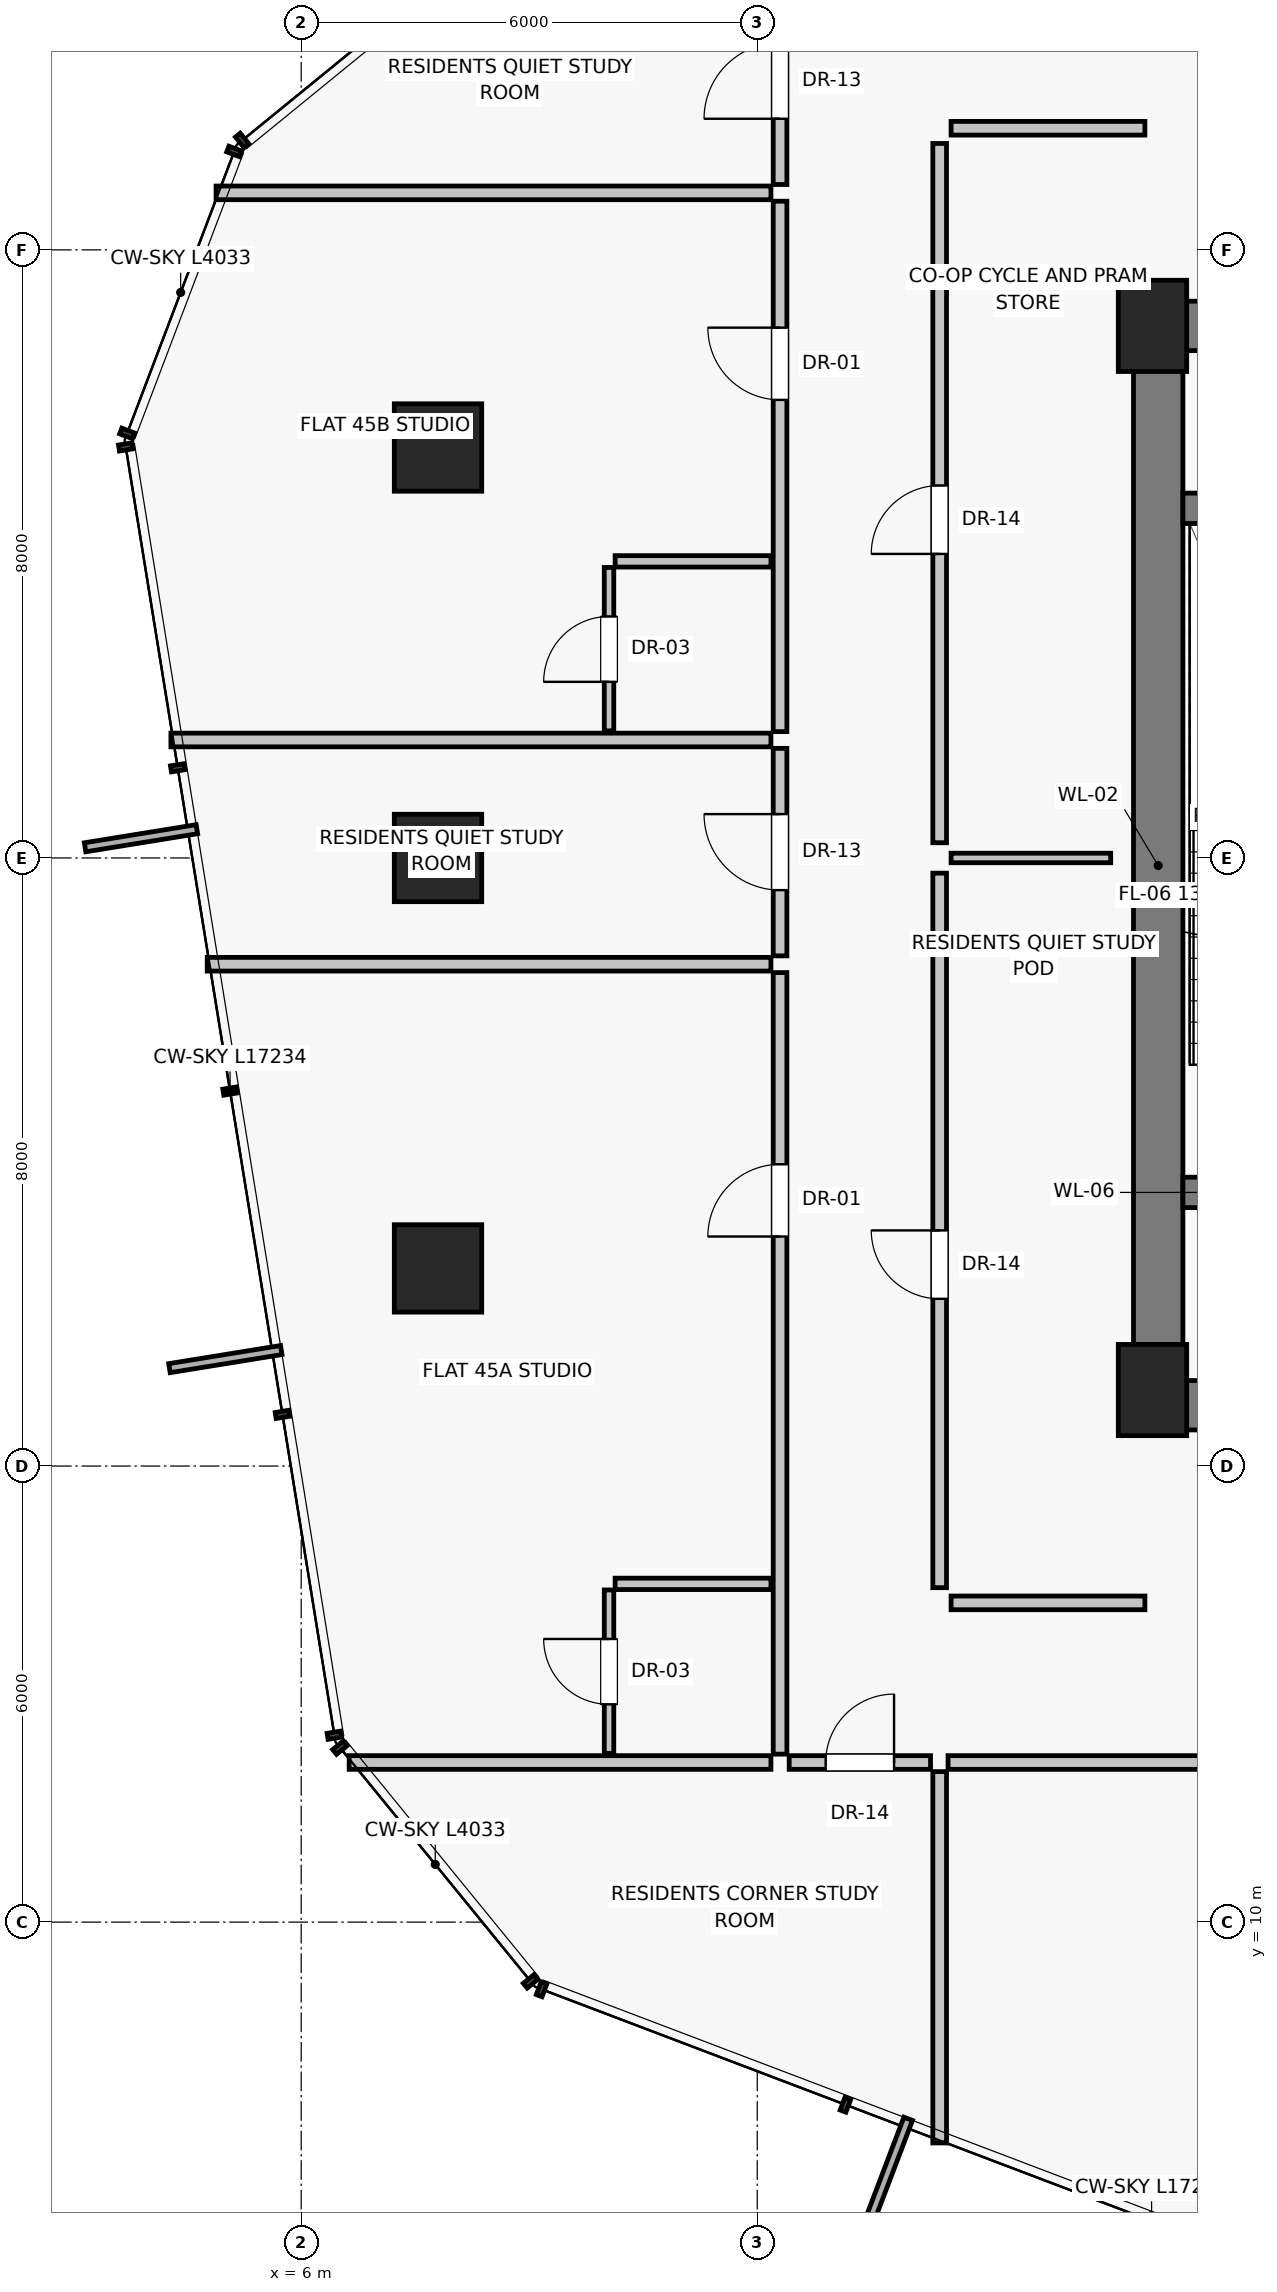
"""IFC4 building model, lengths in metres.
Left out: names, types, materials, properties, quantities, classifications, styles, units other than length and angle.
Written with IfcOpenShell. Run it as: python <this file> out.ifc"""

import sys

from ifc_helpers import new_model, si_unit, direction, frame, frame_2d, origin, origin_2d, place, context, subcontext, project, spatial, rectangle, extrude, source, transform, mapped, element, fill, save


model = new_model("IFC4")
c1 = context("Model", 3, precision=1e-05, world=origin(), true_north=direction((0.0, 1.0)))
c2 = subcontext(c1, "Body", "Model", "MODEL_VIEW")
j1 = project(units=[si_unit("LENGTHUNIT", "METRE"), si_unit("PLANEANGLEUNIT", "RADIAN")], contexts=[c1])
p1 = place(None, origin())
s1 = spatial("IfcSite", under=j1, at=p1, CompositionType="ELEMENT")
p2 = place(p1, origin())
s2 = spatial("IfcBuilding", under=s1, at=p2, CompositionType="ELEMENT")
p3 = place(p2, frame((0.0, 0.0, 158.75)))
s3 = spatial("IfcBuildingStorey", under=s2, at=p3, CompositionType="ELEMENT", Elevation=158.75)
for number, where, z_axis, x_axis in (
    (1, (17.2, 17.0, 0.0), (0.0, 0.0, 1.0), (1.0, 0.0, 0.0)),
    (2, (17.2, 31.0, 0.0), (0.0, 0.0, 1.0), (1.0, 0.0, 0.0)),
):
    element("IfcColumn", number, at=place(p3, frame(where, z_axis=z_axis, x_axis=x_axis)), inside=s3, PredefinedType="PILASTER", context=c2, shape_type="SweptSolid", body=[
        extrude(rectangle(XDim=0.9, YDim=1.2, at=origin_2d()), origin(), (0.0, 0.0, 1.0), 4.3),
    ])
for number, where, z_axis, x_axis in (
    (3, (7.8, 29.4, 0.0), (0.0, 0.0, 1.0), (1.0, 0.0, 0.0)),
    (4, (7.8, 24.0, 0.0), (0.0, 0.0, 1.0), (1.0, 0.0, 0.0)),
    (5, (7.8, 18.6, 0.0), (0.0, 0.0, 1.0), (1.0, 0.0, 0.0)),
):
    element("IfcColumn", number, at=place(p3, frame(where, z_axis=z_axis, x_axis=x_axis)), inside=s3, PredefinedType="COLUMN", context=c2, shape_type="SweptSolid", body=[
        extrude(rectangle(XDim=1.15, YDim=1.15, at=origin_2d()), origin(), (0.0, 0.0, 1.0), 4.3),
    ])
p4 = place(p3, frame((17.275, 16.8, 0.0), z_axis=(0.0, 0.0, 1.0), x_axis=(0.0, 1.0, 0.0)))
e6 = element("IfcWall", 6, at=p4, inside=s3, PredefinedType="SHEAR", context=c2, shape_type="SweptSolid", body=[
    extrude(rectangle(XDim=14.2, YDim=0.65, at=frame_2d((7.1, 0.0))), origin(), (0.0, 0.0, 1.0), 4.05),
])
p5 = place(p3, frame((17.2, 16.8, 0.0), z_axis=(0.0, 0.0, 1.0), x_axis=(1.0, 0.0, 0.0)))
e7 = element("IfcWall", 7, at=p5, inside=s3, PredefinedType="SHEAR", context=c2, shape_type="SweptSolid", body=[
    extrude(rectangle(XDim=5.85, YDim=0.65, at=frame_2d((2.925, 0.0))), origin(), (0.0, 0.0, 1.0), 4.05),
])
p6 = place(p5, frame((1.15, 0.0, 0.0)))
e8 = element("IfcOpeningElement", 8, at=p6, cuts=e7, PredefinedType="OPENING", context=c2, shape_type="SweptSolid", body=[
    extrude(rectangle(XDim=1.2, YDim=2.03, at=frame_2d((0.6, 1.015))), frame((0.0, 0.335, 0.0), z_axis=(0.0, -1.0, 0.0), x_axis=(1.0, 0.0, 0.0)), (0.0, 0.0, 1.0), 0.67),
])
p7 = place(p3, frame((17.2, 31.0, 0.0), z_axis=(0.0, 0.0, 1.0), x_axis=(1.0, 0.0, 0.0)))
e9 = element("IfcWall", 9, at=p7, inside=s3, PredefinedType="SHEAR", context=c2, shape_type="SweptSolid", body=[
    extrude(rectangle(XDim=3.8, YDim=0.65, at=frame_2d((1.9, 0.0))), origin(), (0.0, 0.0, 1.0), 4.05),
])
p8 = place(p7, frame((1.25, 0.0, 0.0)))
e10 = element("IfcOpeningElement", 10, at=p8, cuts=e9, PredefinedType="OPENING", context=c2, shape_type="SweptSolid", body=[
    extrude(rectangle(XDim=0.86, YDim=2.01, at=frame_2d((0.43, 1.005))), frame((0.0, 0.335, 0.0), z_axis=(0.0, -1.0, 0.0), x_axis=(1.0, 0.0, 0.0)), (0.0, 0.0, 1.0), 0.67),
])
p9 = place(p3, frame((17.6, 19.6, 0.0), z_axis=(0.0, 0.0, 1.0), x_axis=(1.0, 0.0, 0.0)))
e11 = element("IfcWall", 11, at=p9, inside=s3, PredefinedType="SHEAR", context=c2, shape_type="SweptSolid", body=[
    extrude(rectangle(XDim=3.4, YDim=0.4, at=frame_2d((1.7, 0.0))), origin(), (0.0, 0.0, 1.0), 4.05),
])
p10 = place(p9, frame((1.05, 0.0, 0.0)))
e12 = element("IfcOpeningElement", 12, at=p10, cuts=e11, PredefinedType="OPENING", context=c2, shape_type="SweptSolid", body=[
    extrude(rectangle(XDim=1.1, YDim=2.03, at=frame_2d((0.55, 1.015))), frame((0.0, 0.21, 0.0), z_axis=(0.0, -1.0, 0.0), x_axis=(1.0, 0.0, 0.0)), (0.0, 0.0, 1.0), 0.42),
])
p11 = place(p3, frame((17.6, 28.6, 0.0), z_axis=(0.0, 0.0, 1.0), x_axis=(1.0, 0.0, 0.0)))
e13 = element("IfcWall", 13, at=p11, inside=s3, PredefinedType="SHEAR", context=c2, shape_type="SweptSolid", body=[
    extrude(rectangle(XDim=3.4, YDim=0.4, at=frame_2d((1.7, 0.0))), origin(), (0.0, 0.0, 1.0), 4.05),
])
p12 = place(p3, frame((14.4, 14.4, 0.0), z_axis=(0.0, 0.0, 1.0), x_axis=(0.0, 1.0, 0.0)))
e14 = element("IfcWall", 14, at=p12, inside=s3, PredefinedType="PARTITIONING", context=c2, shape_type="SweptSolid", body=[
    extrude(rectangle(XDim=9.4, YDim=0.18, at=frame_2d((4.7, 0.0))), origin(), (0.0, 0.0, 1.0), 4.05),
])
p13 = place(p12, frame((3.8, 0.0, 0.0)))
e15 = element("IfcOpeningElement", 15, at=p13, cuts=e14, PredefinedType="OPENING", context=c2, shape_type="SweptSolid", body=[
    extrude(rectangle(XDim=0.9, YDim=2.01, at=frame_2d((0.45, 1.005))), frame((0.0, 0.1, 0.0), z_axis=(0.0, -1.0, 0.0), x_axis=(1.0, 0.0, 0.0)), (0.0, 0.0, 1.0), 0.2),
])
p14 = place(p3, frame((14.4, 24.2, 0.0), z_axis=(0.0, 0.0, 1.0), x_axis=(0.0, 1.0, 0.0)))
e16 = element("IfcWall", 16, at=p14, inside=s3, PredefinedType="PARTITIONING", context=c2, shape_type="SweptSolid", body=[
    extrude(rectangle(XDim=9.2, YDim=0.18, at=frame_2d((4.6, 0.0))), origin(), (0.0, 0.0, 1.0), 4.05),
])
p15 = place(p14, frame((3.8, 0.0, 0.0)))
e17 = element("IfcOpeningElement", 17, at=p15, cuts=e16, PredefinedType="OPENING", context=c2, shape_type="SweptSolid", body=[
    extrude(rectangle(XDim=0.9, YDim=2.01, at=frame_2d((0.45, 1.005))), frame((0.0, 0.1, 0.0), z_axis=(0.0, -1.0, 0.0), x_axis=(1.0, 0.0, 0.0)), (0.0, 0.0, 1.0), 0.2),
])
p16 = place(p3, frame((14.55, 24.0, 0.0), z_axis=(0.0, 0.0, 1.0), x_axis=(1.0, 0.0, 0.0)))
e18 = element("IfcWall", 18, at=p16, inside=s3, PredefinedType="PARTITIONING", context=c2, shape_type="SweptSolid", body=[
    extrude(rectangle(XDim=2.1, YDim=0.125, at=frame_2d((1.05, 0.0))), origin(), (0.0, 0.0, 1.0), 4.05),
])
for number, where, z_axis, x_axis in (
    (19, (14.55, 14.2, 0.0), (0.0, 0.0, 1.0), (1.0, 0.0, 0.0)),
    (20, (14.55, 33.6, 0.0), (0.0, 0.0, 1.0), (1.0, 0.0, 0.0)),
):
    element("IfcWall", number, at=place(p3, frame(where, z_axis=z_axis, x_axis=x_axis)), inside=s3, PredefinedType="PARTITIONING", context=c2, shape_type="SweptSolid", body=[
        extrude(rectangle(XDim=2.55, YDim=0.18, at=frame_2d((1.275, 0.0))), origin(), (0.0, 0.0, 1.0), 4.05),
    ])
p17 = place(p3, frame((14.4, 11.98, 0.0), z_axis=(0.0, 0.0, 1.0), x_axis=(0.0, -1.0, 0.0)))
e21 = element("IfcWall", 21, at=p17, inside=s3, PredefinedType="PARTITIONING", context=c2, shape_type="SweptSolid", body=[
    extrude(rectangle(XDim=4.885, YDim=0.18, at=frame_2d((2.443, 0.0))), origin(), (0.0, 0.0, 1.0), 4.05),
])
p18 = place(p3, frame((14.51, 12.1, 0.0), z_axis=(0.0, 0.0, 1.0), x_axis=(1.0, 0.0, 0.0)))
e22 = element("IfcWall", 22, at=p18, inside=s3, PredefinedType="PARTITIONING", context=c2, shape_type="SweptSolid", body=[
    extrude(rectangle(XDim=10.724, YDim=0.18, at=frame_2d((5.362, 0.0))), origin(), (0.0, 0.0, 1.0), 3.63),
])
p19 = place(p18, frame((4.462, 0.0, 0.0)))
e23 = element("IfcOpeningElement", 23, at=p19, cuts=e22, PredefinedType="OPENING", context=c2, shape_type="SweptSolid", body=[
    extrude(rectangle(XDim=1.8, YDim=2.25, at=frame_2d((0.9, 1.125))), frame((0.0, 0.1, 0.0), z_axis=(0.0, -1.0, 0.0), x_axis=(1.0, 0.0, 0.0)), (0.0, 0.0, 1.0), 0.2),
])
p20 = place(p3, frame((12.18, 12.1, 0.0), z_axis=(0.0, 0.0, 1.0), x_axis=(-1.0, 0.0, 0.0)))
e24 = element("IfcWall", 24, at=p20, inside=s3, PredefinedType="PARTITIONING", context=c2, shape_type="SweptSolid", body=[
    extrude(rectangle(XDim=5.549, YDim=0.18, at=frame_2d((2.774, 0.0))), origin(), (0.0, 0.0, 1.0), 4.05),
])
p21 = place(p3, frame((12.3, 22.712, 0.0), z_axis=(0.0, 0.0, 1.0), x_axis=(0.0, 1.0, 0.0)))
e25 = element("IfcWall", 25, at=p21, inside=s3, PredefinedType="PARTITIONING", context=c2, shape_type="SweptSolid", body=[
    extrude(rectangle(XDim=2.73, YDim=0.18, at=frame_2d((1.365, 0.0))), origin(), (0.0, 0.0, 1.0), 3.63),
])
p22 = place(p21, frame((0.865, 0.0, 0.0)))
e26 = element("IfcOpeningElement", 26, at=p22, cuts=e25, PredefinedType="OPENING", context=c2, shape_type="SweptSolid", body=[
    extrude(rectangle(XDim=1.0, YDim=2.01, at=frame_2d((0.5, 1.005))), frame((0.0, 0.1, 0.0), z_axis=(0.0, -1.0, 0.0), x_axis=(1.0, 0.0, 0.0)), (0.0, 0.0, 1.0), 0.2),
])
p23 = place(p3, frame((12.18, 22.602, 0.0), z_axis=(0.0, 0.0, 1.0), x_axis=(-1.0, 0.0, 0.0)))
e27 = element("IfcWall", 27, at=p23, inside=s3, PredefinedType="PARTITIONING", context=c2, shape_type="SweptSolid", body=[
    extrude(rectangle(XDim=7.416, YDim=0.18, at=frame_2d((3.708, 0.0))), origin(), (0.0, 0.0, 1.0), 4.05),
])
p24 = place(p3, frame((12.3, 12.21, 0.0), z_axis=(0.0, 0.0, 1.0), x_axis=(0.0, 1.0, 0.0)))
e28 = element("IfcWall", 28, at=p24, inside=s3, PredefinedType="PARTITIONING", context=c2, shape_type="SweptSolid", body=[
    extrude(rectangle(XDim=10.282, YDim=0.18, at=frame_2d((5.141, 0.0))), origin(), (0.0, 0.0, 1.0), 3.63),
])
p25 = place(p24, frame((6.81, 0.0, 0.0)))
e29 = element("IfcOpeningElement", 29, at=p25, cuts=e28, PredefinedType="OPENING", context=c2, shape_type="SweptSolid", body=[
    extrude(rectangle(XDim=0.95, YDim=2.02, at=frame_2d((0.475, 1.01))), frame((0.0, 0.1, 0.0), z_axis=(0.0, -1.0, 0.0), x_axis=(1.0, 0.0, 0.0)), (0.0, 0.0, 1.0), 0.2),
])
p26 = place(p3, frame((12.18, 14.45, 0.0), z_axis=(0.0, 0.0, 1.0), x_axis=(-1.0, 0.0, 0.0)))
e30 = element("IfcWall", 30, at=p26, inside=s3, PredefinedType="PARTITIONING", context=c2, shape_type="SweptSolid", body=[
    extrude(rectangle(XDim=2.05, YDim=0.15, at=frame_2d((1.025, 0.0))), origin(), (0.0, 0.0, 1.0), 4.05),
])
p27 = place(p3, frame((10.05, 12.22, 0.0), z_axis=(0.0, 0.0, 1.0), x_axis=(0.0, 1.0, 0.0)))
e31 = element("IfcWall", 31, at=p27, inside=s3, PredefinedType="PARTITIONING", context=c2, shape_type="SweptSolid", body=[
    extrude(rectangle(XDim=2.15, YDim=0.125, at=frame_2d((1.075, 0.0))), origin(), (0.0, 0.0, 1.0), 4.05),
])
p28 = place(p27, frame((0.645, 0.0, 0.0)))
e32 = element("IfcOpeningElement", 32, at=p28, cuts=e31, PredefinedType="OPENING", context=c2, shape_type="SweptSolid", body=[
    extrude(rectangle(XDim=0.86, YDim=2.01, at=frame_2d((0.43, 1.005))), frame((0.0, 0.073, 0.0), z_axis=(0.0, -1.0, 0.0), x_axis=(1.0, 0.0, 0.0)), (0.0, 0.0, 1.0), 0.145),
])
p29 = place(p3, frame((12.18, 25.552, 0.0), z_axis=(0.0, 0.0, 1.0), x_axis=(-1.0, 0.0, 0.0)))
e33 = element("IfcWall", 33, at=p29, inside=s3, PredefinedType="PARTITIONING", context=c2, shape_type="SweptSolid", body=[
    extrude(rectangle(XDim=7.894, YDim=0.18, at=frame_2d((3.947, 0.0))), origin(), (0.0, 0.0, 1.0), 4.05),
])
p30 = place(p3, frame((12.3, 32.86, 0.0), z_axis=(0.0, 0.0, 1.0), x_axis=(0.0, 1.0, 0.0)))
e34 = element("IfcWall", 34, at=p30, inside=s3, PredefinedType="PARTITIONING", context=c2, shape_type="SweptSolid", body=[
    extrude(rectangle(XDim=2.73, YDim=0.18, at=frame_2d((1.365, 0.0))), origin(), (0.0, 0.0, 1.0), 4.05),
])
p31 = place(p30, frame((0.865, 0.0, 0.0)))
e35 = element("IfcOpeningElement", 35, at=p31, cuts=e34, PredefinedType="OPENING", context=c2, shape_type="SweptSolid", body=[
    extrude(rectangle(XDim=1.0, YDim=2.01, at=frame_2d((0.5, 1.005))), frame((0.0, 0.1, 0.0), z_axis=(0.0, -1.0, 0.0), x_axis=(1.0, 0.0, 0.0)), (0.0, 0.0, 1.0), 0.2),
])
p32 = place(p3, frame((12.18, 32.75, 0.0), z_axis=(0.0, 0.0, 1.0), x_axis=(-1.0, 0.0, 0.0)))
e36 = element("IfcWall", 36, at=p32, inside=s3, PredefinedType="PARTITIONING", context=c2, shape_type="SweptSolid", body=[
    extrude(rectangle(XDim=7.3, YDim=0.18, at=frame_2d((3.65, 0.0))), origin(), (0.0, 0.0, 1.0), 4.05),
])
p33 = place(p3, frame((12.3, 25.662, 0.0), z_axis=(0.0, 0.0, 1.0), x_axis=(0.0, 1.0, 0.0)))
e37 = element("IfcWall", 37, at=p33, inside=s3, PredefinedType="PARTITIONING", context=c2, shape_type="SweptSolid", body=[
    extrude(rectangle(XDim=6.978, YDim=0.18, at=frame_2d((3.489, 0.0))), origin(), (0.0, 0.0, 1.0), 3.63),
])
p34 = place(p33, frame((4.365, 0.0, 0.0)))
e38 = element("IfcOpeningElement", 38, at=p34, cuts=e37, PredefinedType="OPENING", context=c2, shape_type="SweptSolid", body=[
    extrude(rectangle(XDim=0.95, YDim=2.02, at=frame_2d((0.475, 1.01))), frame((0.0, 0.1, 0.0), z_axis=(0.0, -1.0, 0.0), x_axis=(1.0, 0.0, 0.0)), (0.0, 0.0, 1.0), 0.2),
])
p35 = place(p3, frame((12.18, 27.902, 0.0), z_axis=(0.0, 0.0, 1.0), x_axis=(-1.0, 0.0, 0.0)))
e39 = element("IfcWall", 39, at=p35, inside=s3, PredefinedType="PARTITIONING", context=c2, shape_type="SweptSolid", body=[
    extrude(rectangle(XDim=2.05, YDim=0.15, at=frame_2d((1.025, 0.0))), origin(), (0.0, 0.0, 1.0), 4.05),
])
p36 = place(p3, frame((10.05, 25.672, 0.0), z_axis=(0.0, 0.0, 1.0), x_axis=(0.0, 1.0, 0.0)))
e40 = element("IfcWall", 40, at=p36, inside=s3, PredefinedType="PARTITIONING", context=c2, shape_type="SweptSolid", body=[
    extrude(rectangle(XDim=2.15, YDim=0.125, at=frame_2d((1.075, 0.0))), origin(), (0.0, 0.0, 1.0), 4.05),
])
p37 = place(p36, frame((0.645, 0.0, 0.0)))
e41 = element("IfcOpeningElement", 41, at=p37, cuts=e40, PredefinedType="OPENING", context=c2, shape_type="SweptSolid", body=[
    extrude(rectangle(XDim=0.86, YDim=2.01, at=frame_2d((0.43, 1.005))), frame((0.0, 0.073, 0.0), z_axis=(0.0, -1.0, 0.0), x_axis=(1.0, 0.0, 0.0)), (0.0, 0.0, 1.0), 0.145),
])
p38 = place(p3, frame((12.42, 12.1, 0.0), z_axis=(0.0, 0.0, 1.0), x_axis=(1.0, 0.0, 0.0)))
e42 = element("IfcWall", 42, at=p38, inside=s3, PredefinedType="PARTITIONING", context=c2, shape_type="SweptSolid", body=[
    extrude(rectangle(XDim=1.86, YDim=0.18, at=frame_2d((0.93, 0.0))), origin(), (0.0, 0.0, 1.0), 4.05),
])
p39 = place(p38, frame((0.48, 0.0, 0.0)))
e43 = element("IfcOpeningElement", 43, at=p39, cuts=e42, PredefinedType="OPENING", context=c2, shape_type="SweptSolid", body=[
    extrude(rectangle(XDim=0.9, YDim=2.01, at=frame_2d((0.45, 1.005))), frame((0.0, 0.1, 0.0), z_axis=(0.0, -1.0, 0.0), x_axis=(1.0, 0.0, 0.0)), (0.0, 0.0, 1.0), 0.2),
])
m1 = source(origin(), c2, "Body", "SweptSolid", [
    extrude(rectangle(XDim=0.9, YDim=2.01, at=frame_2d((0.45, 1.005))), frame((0.0, 0.025, 0.0), z_axis=(0.0, -1.0, 0.0), x_axis=(1.0, 0.0, 0.0)), (0.0, 0.0, 1.0), 0.05),
])
p40 = place(p13, origin())
e44 = element("IfcDoor", 44, at=p40, inside=s3, OperationType="SINGLE_SWING_RIGHT", PredefinedType="DOOR", context=c2, shape_type="MappedRepresentation", body=[
    mapped(m1, transform((0.0, 0.0, 0.0), scale=1.0)),
])
fill(e15, e44)
p41 = place(p15, origin())
e45 = element("IfcDoor", 45, at=p41, inside=s3, OperationType="SINGLE_SWING_LEFT", PredefinedType="DOOR", context=c2, shape_type="MappedRepresentation", body=[
    mapped(m1, transform((0.0, 0.0, 0.0), scale=1.0)),
])
fill(e17, e45)
m2 = source(origin(), c2, "Body", "SweptSolid", [
    extrude(rectangle(XDim=1.0, YDim=2.01, at=frame_2d((0.5, 1.005))), frame((0.0, 0.025, 0.0), z_axis=(0.0, -1.0, 0.0), x_axis=(1.0, 0.0, 0.0)), (0.0, 0.0, 1.0), 0.05),
])
p42 = place(p22, origin())
e46 = element("IfcDoor", 46, at=p42, inside=s3, OperationType="SINGLE_SWING_RIGHT", PredefinedType="DOOR", context=c2, shape_type="MappedRepresentation", body=[
    mapped(m2, transform((0.0, 0.0, 0.0), scale=1.0)),
])
fill(e26, e46)
m3 = source(origin(), c2, "Body", "SweptSolid", [
    extrude(rectangle(XDim=0.95, YDim=2.02, at=frame_2d((0.475, 1.01))), frame((0.0, 0.025, 0.0), z_axis=(0.0, -1.0, 0.0), x_axis=(1.0, 0.0, 0.0)), (0.0, 0.0, 1.0), 0.05),
])
p43 = place(p25, origin())
e47 = element("IfcDoor", 47, at=p43, inside=s3, OperationType="SINGLE_SWING_LEFT", PredefinedType="DOOR", context=c2, shape_type="MappedRepresentation", body=[
    mapped(m3, transform((0.0, 0.0, 0.0), scale=1.0)),
])
fill(e29, e47)
m4 = source(origin(), c2, "Body", "SweptSolid", [
    extrude(rectangle(XDim=0.86, YDim=2.01, at=frame_2d((0.43, 1.005))), frame((0.0, 0.025, 0.0), z_axis=(0.0, -1.0, 0.0), x_axis=(1.0, 0.0, 0.0)), (0.0, 0.0, 1.0), 0.05),
])
p44 = place(p28, origin())
e48 = element("IfcDoor", 48, at=p44, inside=s3, OperationType="SINGLE_SWING_RIGHT", PredefinedType="DOOR", context=c2, shape_type="MappedRepresentation", body=[
    mapped(m4, transform((0.0, 0.0, 0.0), scale=1.0)),
])
fill(e32, e48)
p45 = place(p31, origin())
e49 = element("IfcDoor", 49, at=p45, inside=s3, OperationType="SINGLE_SWING_LEFT", PredefinedType="DOOR", context=c2, shape_type="MappedRepresentation", body=[
    mapped(m2, transform((0.0, 0.0, 0.0), scale=1.0)),
])
fill(e35, e49)
p46 = place(p34, origin())
e50 = element("IfcDoor", 50, at=p46, inside=s3, OperationType="SINGLE_SWING_RIGHT", PredefinedType="DOOR", context=c2, shape_type="MappedRepresentation", body=[
    mapped(m3, transform((0.0, 0.0, 0.0), scale=1.0)),
])
fill(e38, e50)
p47 = place(p37, origin())
e51 = element("IfcDoor", 51, at=p47, inside=s3, OperationType="SINGLE_SWING_LEFT", PredefinedType="DOOR", context=c2, shape_type="MappedRepresentation", body=[
    mapped(m4, transform((0.0, 0.0, 0.0), scale=1.0)),
])
fill(e41, e51)
p48 = place(p39, origin())
e52 = element("IfcDoor", 52, at=p48, inside=s3, OperationType="SINGLE_SWING_RIGHT", PredefinedType="DOOR", context=c2, shape_type="MappedRepresentation", body=[
    mapped(m1, transform((0.0, 0.0, 0.0), scale=1.0)),
])
fill(e43, e52)
save(model, sys.argv[1])
